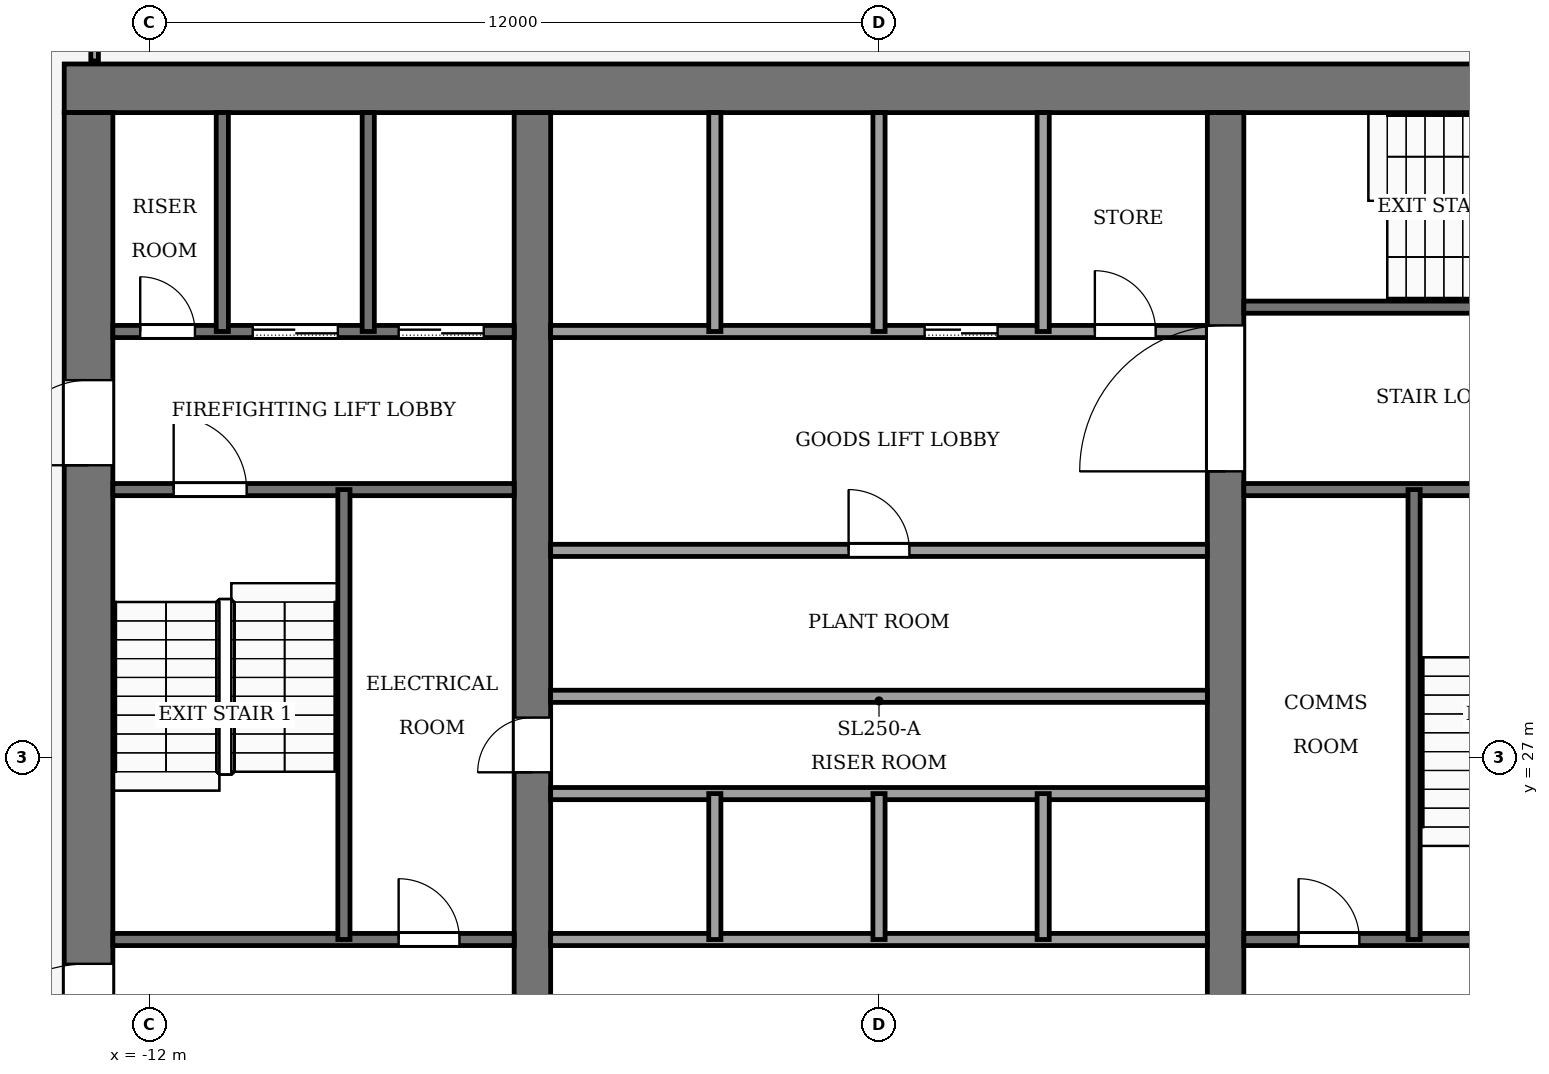
"""IFC4 building model, lengths in metres.
Left out: names, types, materials, properties, quantities, classifications, styles, units other than length and angle.
Written with IfcOpenShell. Run it as: python <this file> out.ifc"""

import sys

from ifc_helpers import new_model, si_unit, direction, frame, frame_2d, origin, place, context, subcontext, project, spatial, rectangle, extrude, element, fill, save


model = new_model("IFC4")
c1 = context("Model", 3, precision=1e-05, world=origin(), true_north=direction((0.0, 1.0)))
c2 = subcontext(c1, "Body", "Model", "MODEL_VIEW")
j1 = project(units=[si_unit("LENGTHUNIT", "METRE"), si_unit("PLANEANGLEUNIT", "RADIAN")], contexts=[c1])
p1 = place(None, origin())
s1 = spatial("IfcSite", under=j1, at=p1, CompositionType="ELEMENT")
p2 = place(p1, origin())
s2 = spatial("IfcBuilding", under=s1, at=p2, CompositionType="ELEMENT")
p3 = place(p2, frame((0.0, 0.0, 282.0)))
s3 = spatial("IfcBuildingStorey", under=s2, at=p3, CompositionType="ELEMENT", Elevation=282.0)
p4 = place(p3, frame((-13.4, 38.0, -0.25), z_axis=(0.0, 0.0, 1.0), x_axis=(1.0, 0.0, 0.0)))
e1 = element("IfcWall", 1, at=p4, inside=s3, PredefinedType="SHEAR", context=c2, shape_type="SweptSolid", body=[
    extrude(rectangle(XDim=26.8, YDim=0.8, at=frame_2d((13.4, 0.0))), origin(), (0.0, 0.0, 1.0), 7.12),
])
p5 = place(p3, frame((-13.0, 18.4, -0.25), z_axis=(0.0, 0.0, 1.0), x_axis=(0.0, 1.0, 0.0)))
e2 = element("IfcWall", 2, at=p5, inside=s3, PredefinedType="SHEAR", context=c2, shape_type="SweptSolid", body=[
    extrude(rectangle(XDim=19.2, YDim=0.8, at=frame_2d((9.6, 0.0))), origin(), (0.0, 0.0, 1.0), 7.12),
])
p6 = place(p5, frame((2.8, 0.0, 0.25)))
e3 = element("IfcOpeningElement", 3, at=p6, cuts=e2, PredefinedType="OPENING", context=c2, shape_type="SweptSolid", body=[
    extrude(rectangle(XDim=2.4, YDim=2.4, at=frame_2d((1.2, 1.2))), frame((0.0, 0.41, 0.0), z_axis=(0.0, -1.0, 0.0), x_axis=(1.0, 0.0, 0.0)), (0.0, 0.0, 1.0), 0.82),
])
p7 = place(p5, frame((13.4, 0.0, 0.25)))
e4 = element("IfcOpeningElement", 4, at=p7, cuts=e2, PredefinedType="OPENING", context=c2, shape_type="SweptSolid", body=[
    extrude(rectangle(XDim=1.4, YDim=2.2, at=frame_2d((0.7, 1.1))), frame((0.0, 0.41, 0.0), z_axis=(0.0, -1.0, 0.0), x_axis=(1.0, 0.0, 0.0)), (0.0, 0.0, 1.0), 0.82),
])
p8 = place(p3, frame((-5.7, 18.4, -0.25), z_axis=(0.0, 0.0, 1.0), x_axis=(0.0, 1.0, 0.0)))
e5 = element("IfcWall", 5, at=p8, inside=s3, PredefinedType="SHEAR", context=c2, shape_type="SweptSolid", body=[
    extrude(rectangle(XDim=19.2, YDim=0.6, at=frame_2d((9.6, 0.0))), origin(), (0.0, 0.0, 1.0), 7.12),
])
p9 = place(p8, frame((8.35, 0.0, 0.25)))
e6 = element("IfcOpeningElement", 6, at=p9, cuts=e5, PredefinedType="OPENING", context=c2, shape_type="SweptSolid", body=[
    extrude(rectangle(XDim=0.9, YDim=2.1, at=frame_2d((0.45, 1.05))), frame((0.0, 0.31, 0.0), z_axis=(0.0, -1.0, 0.0), x_axis=(1.0, 0.0, 0.0)), (0.0, 0.0, 1.0), 0.62),
])
p10 = place(p3, frame((5.7, 18.4, -0.25), z_axis=(0.0, 0.0, 1.0), x_axis=(0.0, 1.0, 0.0)))
e7 = element("IfcWall", 7, at=p10, inside=s3, PredefinedType="SHEAR", context=c2, shape_type="SweptSolid", body=[
    extrude(rectangle(XDim=19.2, YDim=0.6, at=frame_2d((9.6, 0.0))), origin(), (0.0, 0.0, 1.0), 7.12),
])
p11 = place(p10, frame((13.3, 0.0, 0.25)))
e8 = element("IfcOpeningElement", 8, at=p11, cuts=e7, PredefinedType="OPENING", context=c2, shape_type="SweptSolid", body=[
    extrude(rectangle(XDim=2.4, YDim=2.4, at=frame_2d((1.2, 1.2))), frame((0.0, 0.31, 0.0), z_axis=(0.0, -1.0, 0.0), x_axis=(1.0, 0.0, 0.0)), (0.0, 0.0, 1.0), 0.62),
])
p12 = place(p3, frame((-12.6, 24.0, 0.0), z_axis=(0.0, 0.0, 1.0), x_axis=(1.0, 0.0, 0.0)))
e9 = element("IfcWall", 9, at=p12, inside=s3, PredefinedType="PARTITIONING", context=c2, shape_type="SweptSolid", body=[
    extrude(rectangle(XDim=6.6, YDim=0.2, at=frame_2d((3.3, 0.0))), origin(), (0.0, 0.0, 1.0), 6.87),
])
p13 = place(p12, frame((4.7, 0.0, 0.0)))
e10 = element("IfcOpeningElement", 10, at=p13, cuts=e9, PredefinedType="OPENING", context=c2, shape_type="SweptSolid", body=[
    extrude(rectangle(XDim=1.0, YDim=2.1, at=frame_2d((0.5, 1.05))), frame((0.0, 0.11, 0.0), z_axis=(0.0, -1.0, 0.0), x_axis=(1.0, 0.0, 0.0)), (0.0, 0.0, 1.0), 0.22),
])
p14 = place(p3, frame((-5.4, 24.0, 0.0), z_axis=(0.0, 0.0, 1.0), x_axis=(1.0, 0.0, 0.0)))
e11 = element("IfcWall", 11, at=p14, inside=s3, PredefinedType="PARTITIONING", context=c2, shape_type="SweptSolid", body=[
    extrude(rectangle(XDim=10.8, YDim=0.2, at=frame_2d((5.4, 0.0))), origin(), (0.0, 0.0, 1.0), 6.87),
])
p15 = place(p3, frame((6.0, 24.0, 0.0), z_axis=(0.0, 0.0, 1.0), x_axis=(1.0, 0.0, 0.0)))
e12 = element("IfcWall", 12, at=p15, inside=s3, PredefinedType="PARTITIONING", context=c2, shape_type="SweptSolid", body=[
    extrude(rectangle(XDim=6.6, YDim=0.2, at=frame_2d((3.3, 0.0))), origin(), (0.0, 0.0, 1.0), 6.87),
])
p16 = place(p15, frame((0.9, 0.0, 0.0)))
e13 = element("IfcOpeningElement", 13, at=p16, cuts=e12, PredefinedType="OPENING", context=c2, shape_type="SweptSolid", body=[
    extrude(rectangle(XDim=1.0, YDim=2.1, at=frame_2d((0.5, 1.05))), frame((0.0, 0.11, 0.0), z_axis=(0.0, -1.0, 0.0), x_axis=(1.0, 0.0, 0.0)), (0.0, 0.0, 1.0), 0.22),
])
p17 = place(p15, frame((4.4, 0.0, 0.0)))
e14 = element("IfcOpeningElement", 14, at=p17, cuts=e12, PredefinedType="OPENING", context=c2, shape_type="SweptSolid", body=[
    extrude(rectangle(XDim=1.2, YDim=2.2, at=frame_2d((0.6, 1.1))), frame((0.0, 0.11, 0.0), z_axis=(0.0, -1.0, 0.0), x_axis=(1.0, 0.0, 0.0)), (0.0, 0.0, 1.0), 0.22),
])
for number, where, z_axis, x_axis in (
    (15, (-5.4, 26.4, 0.0), (0.0, 0.0, 1.0), (1.0, 0.0, 0.0)),
    (16, (-5.4, 28.0, 0.0), (0.0, 0.0, 1.0), (1.0, 0.0, 0.0)),
):
    element("IfcWall", number, at=place(p3, frame(where, z_axis=z_axis, x_axis=x_axis)), inside=s3, PredefinedType="PARTITIONING", context=c2, shape_type="SweptSolid", body=[
        extrude(rectangle(XDim=10.8, YDim=0.2, at=frame_2d((5.4, 0.0))), origin(), (0.0, 0.0, 1.0), 6.87),
    ])
p18 = place(p3, frame((-5.4, 30.4, 0.0), z_axis=(0.0, 0.0, 1.0), x_axis=(1.0, 0.0, 0.0)))
e17 = element("IfcWall", 17, at=p18, inside=s3, PredefinedType="PARTITIONING", context=c2, shape_type="SweptSolid", body=[
    extrude(rectangle(XDim=10.8, YDim=0.2, at=frame_2d((5.4, 0.0))), origin(), (0.0, 0.0, 1.0), 6.87),
])
p19 = place(p18, frame((4.9, 0.0, 0.0)))
e18 = element("IfcOpeningElement", 18, at=p19, cuts=e17, PredefinedType="OPENING", context=c2, shape_type="SweptSolid", body=[
    extrude(rectangle(XDim=1.0, YDim=2.1, at=frame_2d((0.5, 1.05))), frame((0.0, 0.11, 0.0), z_axis=(0.0, -1.0, 0.0), x_axis=(1.0, 0.0, 0.0)), (0.0, 0.0, 1.0), 0.22),
])
p20 = place(p3, frame((-12.6, 31.4, 0.0), z_axis=(0.0, 0.0, 1.0), x_axis=(1.0, 0.0, 0.0)))
e19 = element("IfcWall", 19, at=p20, inside=s3, PredefinedType="PARTITIONING", context=c2, shape_type="SweptSolid", body=[
    extrude(rectangle(XDim=6.6, YDim=0.2, at=frame_2d((3.3, 0.0))), origin(), (0.0, 0.0, 1.0), 6.87),
])
p21 = place(p20, frame((1.0, 0.0, 0.0)))
e20 = element("IfcOpeningElement", 20, at=p21, cuts=e19, PredefinedType="OPENING", context=c2, shape_type="SweptSolid", body=[
    extrude(rectangle(XDim=1.2, YDim=2.2, at=frame_2d((0.6, 1.1))), frame((0.0, 0.11, 0.0), z_axis=(0.0, -1.0, 0.0), x_axis=(1.0, 0.0, 0.0)), (0.0, 0.0, 1.0), 0.22),
])
p22 = place(p3, frame((6.0, 31.4, 0.0), z_axis=(0.0, 0.0, 1.0), x_axis=(1.0, 0.0, 0.0)))
e21 = element("IfcWall", 21, at=p22, inside=s3, PredefinedType="PARTITIONING", context=c2, shape_type="SweptSolid", body=[
    extrude(rectangle(XDim=6.6, YDim=0.2, at=frame_2d((3.3, 0.0))), origin(), (0.0, 0.0, 1.0), 6.87),
])
p23 = place(p3, frame((-12.6, 34.0, 0.0), z_axis=(0.0, 0.0, 1.0), x_axis=(1.0, 0.0, 0.0)))
e22 = element("IfcWall", 22, at=p23, inside=s3, PredefinedType="PARTITIONING", context=c2, shape_type="SweptSolid", body=[
    extrude(rectangle(XDim=6.6, YDim=0.2, at=frame_2d((3.3, 0.0))), origin(), (0.0, 0.0, 1.0), 6.87),
])
p24 = place(p23, frame((4.7, 0.0, 0.0)))
e23 = element("IfcOpeningElement", 23, at=p24, cuts=e22, PredefinedType="OPENING", context=c2, shape_type="SweptSolid", body=[
    extrude(rectangle(XDim=1.4, YDim=2.2, at=frame_2d((0.7, 1.1))), frame((0.0, 0.11, 0.0), z_axis=(0.0, -1.0, 0.0), x_axis=(1.0, 0.0, 0.0)), (0.0, 0.0, 1.0), 0.22),
])
p25 = place(p23, frame((2.3, 0.0, 0.0)))
e24 = element("IfcOpeningElement", 24, at=p25, cuts=e22, PredefinedType="OPENING", context=c2, shape_type="SweptSolid", body=[
    extrude(rectangle(XDim=1.4, YDim=2.2, at=frame_2d((0.7, 1.1))), frame((0.0, 0.11, 0.0), z_axis=(0.0, -1.0, 0.0), x_axis=(1.0, 0.0, 0.0)), (0.0, 0.0, 1.0), 0.22),
])
p26 = place(p23, frame((0.45, 0.0, 0.0)))
e25 = element("IfcOpeningElement", 25, at=p26, cuts=e22, PredefinedType="OPENING", context=c2, shape_type="SweptSolid", body=[
    extrude(rectangle(XDim=0.9, YDim=2.1, at=frame_2d((0.45, 1.05))), frame((0.0, 0.11, 0.0), z_axis=(0.0, -1.0, 0.0), x_axis=(1.0, 0.0, 0.0)), (0.0, 0.0, 1.0), 0.22),
])
p27 = place(p3, frame((-5.4, 34.0, 0.0), z_axis=(0.0, 0.0, 1.0), x_axis=(1.0, 0.0, 0.0)))
e26 = element("IfcWall", 26, at=p27, inside=s3, PredefinedType="PARTITIONING", context=c2, shape_type="SweptSolid", body=[
    extrude(rectangle(XDim=10.8, YDim=0.2, at=frame_2d((5.4, 0.0))), origin(), (0.0, 0.0, 1.0), 6.87),
])
p28 = place(p27, frame((6.15, 0.0, 0.0)))
e27 = element("IfcOpeningElement", 27, at=p28, cuts=e26, PredefinedType="OPENING", context=c2, shape_type="SweptSolid", body=[
    extrude(rectangle(XDim=1.2, YDim=2.2, at=frame_2d((0.6, 1.1))), frame((0.0, 0.11, 0.0), z_axis=(0.0, -1.0, 0.0), x_axis=(1.0, 0.0, 0.0)), (0.0, 0.0, 1.0), 0.22),
])
p29 = place(p27, frame((8.95, 0.0, 0.0)))
e28 = element("IfcOpeningElement", 28, at=p29, cuts=e26, PredefinedType="OPENING", context=c2, shape_type="SweptSolid", body=[
    extrude(rectangle(XDim=1.0, YDim=2.1, at=frame_2d((0.5, 1.05))), frame((0.0, 0.11, 0.0), z_axis=(0.0, -1.0, 0.0), x_axis=(1.0, 0.0, 0.0)), (0.0, 0.0, 1.0), 0.22),
])
p30 = place(p3, frame((6.0, 34.4, 0.0), z_axis=(0.0, 0.0, 1.0), x_axis=(1.0, 0.0, 0.0)))
e29 = element("IfcWall", 29, at=p30, inside=s3, PredefinedType="PARTITIONING", context=c2, shape_type="SweptSolid", body=[
    extrude(rectangle(XDim=6.6, YDim=0.2, at=frame_2d((3.3, 0.0))), origin(), (0.0, 0.0, 1.0), 6.87),
])
p31 = place(p30, frame((4.8, 0.0, 0.0)))
e30 = element("IfcOpeningElement", 30, at=p31, cuts=e29, PredefinedType="OPENING", context=c2, shape_type="SweptSolid", body=[
    extrude(rectangle(XDim=1.2, YDim=2.2, at=frame_2d((0.6, 1.1))), frame((0.0, 0.11, 0.0), z_axis=(0.0, -1.0, 0.0), x_axis=(1.0, 0.0, 0.0)), (0.0, 0.0, 1.0), 0.22),
])
p32 = place(p3, frame((-10.8, 34.0, 0.0), z_axis=(0.0, 0.0, 1.0), x_axis=(0.0, 1.0, 0.0)))
e31 = element("IfcWall", 31, at=p32, inside=s3, PredefinedType="PARTITIONING", context=c2, shape_type="SweptSolid", body=[
    extrude(rectangle(XDim=3.6, YDim=0.2, at=frame_2d((1.8, 0.0))), origin(), (0.0, 0.0, 1.0), 6.87),
])
p33 = place(p3, frame((-8.8, 24.0, 0.0), z_axis=(0.0, 0.0, 1.0), x_axis=(0.0, 1.0, 0.0)))
e32 = element("IfcWall", 32, at=p33, inside=s3, PredefinedType="PARTITIONING", context=c2, shape_type="SweptSolid", body=[
    extrude(rectangle(XDim=7.4, YDim=0.2, at=frame_2d((3.7, 0.0))), origin(), (0.0, 0.0, 1.0), 6.87),
])
p34 = place(p3, frame((-8.4, 34.0, 0.0), z_axis=(0.0, 0.0, 1.0), x_axis=(0.0, 1.0, 0.0)))
e33 = element("IfcWall", 33, at=p34, inside=s3, PredefinedType="PARTITIONING", context=c2, shape_type="SweptSolid", body=[
    extrude(rectangle(XDim=3.6, YDim=0.2, at=frame_2d((1.8, 0.0))), origin(), (0.0, 0.0, 1.0), 6.87),
])
p35 = place(p3, frame((-2.7, 24.0, 0.0), z_axis=(0.0, 0.0, 1.0), x_axis=(0.0, 1.0, 0.0)))
e34 = element("IfcWall", 34, at=p35, inside=s3, PredefinedType="PARTITIONING", context=c2, shape_type="SweptSolid", body=[
    extrude(rectangle(XDim=2.4, YDim=0.2, at=frame_2d((1.2, 0.0))), origin(), (0.0, 0.0, 1.0), 6.87),
])
p36 = place(p3, frame((-2.7, 34.0, 0.0), z_axis=(0.0, 0.0, 1.0), x_axis=(0.0, 1.0, 0.0)))
e35 = element("IfcWall", 35, at=p36, inside=s3, PredefinedType="PARTITIONING", context=c2, shape_type="SweptSolid", body=[
    extrude(rectangle(XDim=3.6, YDim=0.2, at=frame_2d((1.8, 0.0))), origin(), (0.0, 0.0, 1.0), 6.87),
])
p37 = place(p3, frame((0.0, 24.0, 0.0), z_axis=(0.0, 0.0, 1.0), x_axis=(0.0, 1.0, 0.0)))
e36 = element("IfcWall", 36, at=p37, inside=s3, PredefinedType="PARTITIONING", context=c2, shape_type="SweptSolid", body=[
    extrude(rectangle(XDim=2.4, YDim=0.2, at=frame_2d((1.2, 0.0))), origin(), (0.0, 0.0, 1.0), 6.87),
])
p38 = place(p3, frame((0.0, 34.0, 0.0), z_axis=(0.0, 0.0, 1.0), x_axis=(0.0, 1.0, 0.0)))
e37 = element("IfcWall", 37, at=p38, inside=s3, PredefinedType="PARTITIONING", context=c2, shape_type="SweptSolid", body=[
    extrude(rectangle(XDim=3.6, YDim=0.2, at=frame_2d((1.8, 0.0))), origin(), (0.0, 0.0, 1.0), 6.87),
])
p39 = place(p3, frame((2.7, 24.0, 0.0), z_axis=(0.0, 0.0, 1.0), x_axis=(0.0, 1.0, 0.0)))
e38 = element("IfcWall", 38, at=p39, inside=s3, PredefinedType="PARTITIONING", context=c2, shape_type="SweptSolid", body=[
    extrude(rectangle(XDim=2.4, YDim=0.2, at=frame_2d((1.2, 0.0))), origin(), (0.0, 0.0, 1.0), 6.87),
])
p40 = place(p3, frame((2.7, 34.0, 0.0), z_axis=(0.0, 0.0, 1.0), x_axis=(0.0, 1.0, 0.0)))
e39 = element("IfcWall", 39, at=p40, inside=s3, PredefinedType="PARTITIONING", context=c2, shape_type="SweptSolid", body=[
    extrude(rectangle(XDim=3.6, YDim=0.2, at=frame_2d((1.8, 0.0))), origin(), (0.0, 0.0, 1.0), 6.87),
])
p41 = place(p3, frame((8.8, 24.0, 0.0), z_axis=(0.0, 0.0, 1.0), x_axis=(0.0, 1.0, 0.0)))
e40 = element("IfcWall", 40, at=p41, inside=s3, PredefinedType="PARTITIONING", context=c2, shape_type="SweptSolid", body=[
    extrude(rectangle(XDim=7.4, YDim=0.2, at=frame_2d((3.7, 0.0))), origin(), (0.0, 0.0, 1.0), 6.87),
])
p42 = place(p3, frame((-12.9, 66.958, 0.0), z_axis=(0.0, 0.0, 1.0), x_axis=(0.0, -1.0, 0.0)))
e41 = element("IfcWall", 41, at=p42, inside=s3, PredefinedType="PARTITIONING", context=c2, shape_type="SweptSolid", body=[
    extrude(rectangle(XDim=28.508, YDim=0.125, at=frame_2d((14.254, 0.0))), origin(), (0.0, 0.0, 1.0), 6.35),
])
p43 = place(p28, origin())
e42 = element("IfcDoor", 42, at=p43, inside=s3, OperationType="SLIDING_TO_LEFT", PredefinedType="DOOR", context=c2, shape_type="SweptSolid", body=[
    extrude(rectangle(XDim=1.2, YDim=2.2, at=frame_2d((0.6, 1.1))), frame((0.0, 0.025, 0.0), z_axis=(0.0, -1.0, 0.0), x_axis=(1.0, 0.0, 0.0)), (0.0, 0.0, 1.0), 0.05),
])
fill(e27, e42)
p44 = place(p24, origin())
e43 = element("IfcDoor", 43, at=p44, inside=s3, OperationType="SLIDING_TO_LEFT", PredefinedType="DOOR", context=c2, shape_type="SweptSolid", body=[
    extrude(rectangle(XDim=1.4, YDim=2.2, at=frame_2d((0.7, 1.1))), frame((0.0, 0.025, 0.0), z_axis=(0.0, -1.0, 0.0), x_axis=(1.0, 0.0, 0.0)), (0.0, 0.0, 1.0), 0.05),
])
fill(e23, e43)
p45 = place(p25, origin())
e44 = element("IfcDoor", 44, at=p45, inside=s3, OperationType="SLIDING_TO_LEFT", PredefinedType="DOOR", context=c2, shape_type="SweptSolid", body=[
    extrude(rectangle(XDim=1.4, YDim=2.2, at=frame_2d((0.7, 1.1))), frame((0.0, 0.025, 0.0), z_axis=(0.0, -1.0, 0.0), x_axis=(1.0, 0.0, 0.0)), (0.0, 0.0, 1.0), 0.05),
])
fill(e24, e44)
p46 = place(p26, origin())
e45 = element("IfcDoor", 45, at=p46, inside=s3, OperationType="SINGLE_SWING_RIGHT", PredefinedType="DOOR", context=c2, shape_type="SweptSolid", body=[
    extrude(rectangle(XDim=0.9, YDim=2.1, at=frame_2d((0.45, 1.05))), frame((0.0, 0.025, 0.0), z_axis=(0.0, -1.0, 0.0), x_axis=(1.0, 0.0, 0.0)), (0.0, 0.0, 1.0), 0.05),
])
fill(e25, e45)
p47 = place(p19, origin())
e46 = element("IfcDoor", 46, at=p47, inside=s3, OperationType="SINGLE_SWING_RIGHT", PredefinedType="DOOR", context=c2, shape_type="SweptSolid", body=[
    extrude(rectangle(XDim=1.0, YDim=2.1, at=frame_2d((0.5, 1.05))), frame((0.0, 0.025, 0.0), z_axis=(0.0, -1.0, 0.0), x_axis=(1.0, 0.0, 0.0)), (0.0, 0.0, 1.0), 0.05),
])
fill(e18, e46)
p48 = place(p13, origin())
e47 = element("IfcDoor", 47, at=p48, inside=s3, OperationType="SINGLE_SWING_LEFT", PredefinedType="DOOR", context=c2, shape_type="SweptSolid", body=[
    extrude(rectangle(XDim=1.0, YDim=2.1, at=frame_2d((0.5, 1.05))), frame((0.0, 0.025, 0.0), z_axis=(0.0, -1.0, 0.0), x_axis=(1.0, 0.0, 0.0)), (0.0, 0.0, 1.0), 0.05),
])
fill(e10, e47)
p49 = place(p16, origin())
e48 = element("IfcDoor", 48, at=p49, inside=s3, OperationType="SINGLE_SWING_RIGHT", PredefinedType="DOOR", context=c2, shape_type="SweptSolid", body=[
    extrude(rectangle(XDim=1.0, YDim=2.1, at=frame_2d((0.5, 1.05))), frame((0.0, 0.025, 0.0), z_axis=(0.0, -1.0, 0.0), x_axis=(1.0, 0.0, 0.0)), (0.0, 0.0, 1.0), 0.05),
])
fill(e13, e48)
p50 = place(p29, origin())
e49 = element("IfcDoor", 49, at=p50, inside=s3, OperationType="SINGLE_SWING_LEFT", PredefinedType="DOOR", context=c2, shape_type="SweptSolid", body=[
    extrude(rectangle(XDim=1.0, YDim=2.1, at=frame_2d((0.5, 1.05))), frame((0.0, 0.025, 0.0), z_axis=(0.0, -1.0, 0.0), x_axis=(1.0, 0.0, 0.0)), (0.0, 0.0, 1.0), 0.05),
])
fill(e28, e49)
p51 = place(p9, origin())
e50 = element("IfcDoor", 50, at=p51, inside=s3, OperationType="SINGLE_SWING_LEFT", PredefinedType="DOOR", context=c2, shape_type="SweptSolid", body=[
    extrude(rectangle(XDim=0.9, YDim=2.1, at=frame_2d((0.45, 1.05))), frame((0.0, 0.025, 0.0), z_axis=(0.0, -1.0, 0.0), x_axis=(1.0, 0.0, 0.0)), (0.0, 0.0, 1.0), 0.05),
])
fill(e6, e50)
p52 = place(p21, origin())
e51 = element("IfcDoor", 51, at=p52, inside=s3, OperationType="SINGLE_SWING_LEFT", PredefinedType="DOOR", context=c2, shape_type="SweptSolid", body=[
    extrude(rectangle(XDim=1.2, YDim=2.2, at=frame_2d((0.6, 1.1))), frame((0.0, 0.025, 0.0), z_axis=(0.0, -1.0, 0.0), x_axis=(1.0, 0.0, 0.0)), (0.0, 0.0, 1.0), 0.05),
])
fill(e20, e51)
p53 = place(p11, origin())
e52 = element("IfcDoor", 52, at=p53, inside=s3, OperationType="DOUBLE_DOOR_SINGLE_SWING", PredefinedType="DOOR", context=c2, shape_type="SweptSolid", body=[
    extrude(rectangle(XDim=2.4, YDim=2.4, at=frame_2d((1.2, 1.2))), frame((0.0, 0.025, 0.0), z_axis=(0.0, -1.0, 0.0), x_axis=(1.0, 0.0, 0.0)), (0.0, 0.0, 1.0), 0.05),
])
fill(e8, e52)
p54 = place(p6, origin())
e53 = element("IfcDoor", 53, at=p54, inside=s3, OperationType="DOUBLE_DOOR_SINGLE_SWING", PredefinedType="DOOR", context=c2, shape_type="SweptSolid", body=[
    extrude(rectangle(XDim=2.4, YDim=2.4, at=frame_2d((1.2, 1.2))), frame((0.0, 0.025, 0.0), z_axis=(0.0, -1.0, 0.0), x_axis=(1.0, 0.0, 0.0)), (0.0, 0.0, 1.0), 0.05),
])
fill(e3, e53)
p55 = place(p7, origin())
e54 = element("IfcDoor", 54, at=p55, inside=s3, OperationType="SINGLE_SWING_LEFT", PredefinedType="DOOR", context=c2, shape_type="SweptSolid", body=[
    extrude(rectangle(XDim=1.4, YDim=2.2, at=frame_2d((0.7, 1.1))), frame((0.0, 0.025, 0.0), z_axis=(0.0, -1.0, 0.0), x_axis=(1.0, 0.0, 0.0)), (0.0, 0.0, 1.0), 0.05),
])
fill(e4, e54)
save(model, sys.argv[1])
